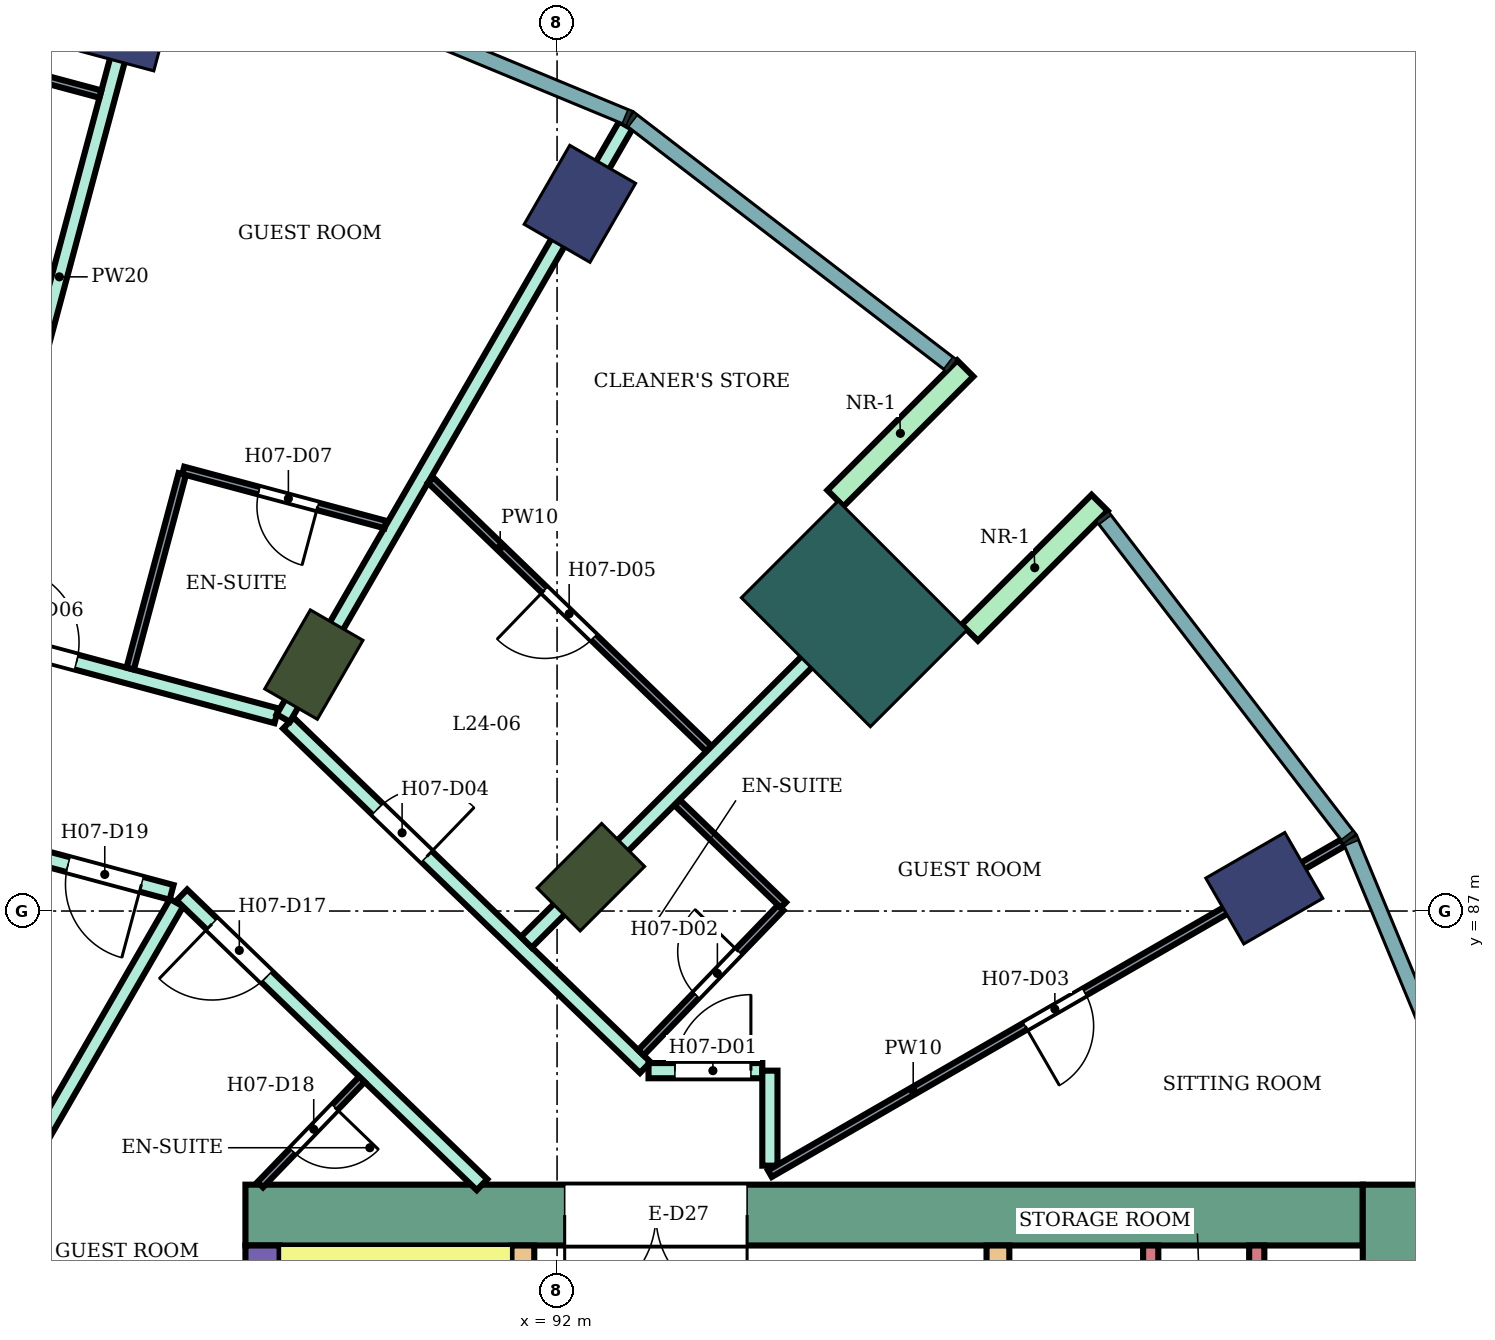
"""IFC4 building model, lengths in metres.
Left out: names, types, materials, properties, quantities, classifications, styles, units other than length and angle.
Written with IfcOpenShell. Run it as: python <this file> out.ifc"""

import sys

from ifc_helpers import new_model, si_unit, direction, frame, frame_2d, origin, origin_2d, place, context, subcontext, project, spatial, rectangle, extrude, element, fill, save


model = new_model("IFC4")
c1 = context("Model", 3, precision=1e-05, world=origin(), true_north=direction((0.0, 1.0)))
c2 = subcontext(c1, "Body", "Model", "MODEL_VIEW")
j1 = project(units=[si_unit("LENGTHUNIT", "METRE"), si_unit("PLANEANGLEUNIT", "RADIAN")], contexts=[c1])
p1 = place(None, origin())
s1 = spatial("IfcSite", under=j1, at=p1, CompositionType="ELEMENT")
p2 = place(p1, origin())
s2 = spatial("IfcBuilding", under=s1, at=p2, CompositionType="ELEMENT")
p3 = place(p2, frame((0.0, 0.0, 105.2)))
s3 = spatial("IfcBuildingStorey", under=s2, at=p3, CompositionType="ELEMENT", Elevation=105.2)
for number, where, z_axis, x_axis in (
    (1, (101.304, 87.3, 0.0), (0.0, 0.0, 1.0), (0.866, 0.5, 0.0)),
    (2, (92.3, 96.304, 0.0), (0.0, 0.0, 1.0), (0.5, 0.866, 0.0)),
    (3, (86.367, 98.762, 0.0), (0.0, 0.0, 1.0), (0.259, 0.966, 0.0)),
):
    element("IfcColumn", number, at=place(p3, frame(where, z_axis=z_axis, x_axis=x_axis)), inside=s3, PredefinedType="COLUMN", context=c2, shape_type="SweptSolid", body=[
        extrude(rectangle(XDim=1.2, YDim=1.0, at=origin_2d()), origin(), (0.0, 0.0, 1.0), 3.8),
    ])
for number, where, z_axis, x_axis in (
    (4, (92.445, 87.445, 0.0), (0.0, 0.0, 1.0), (0.707, 0.707, 0.0)),
    (5, (88.8, 90.242, 0.0), (0.0, 0.0, 1.0), (0.5, 0.866, 0.0)),
):
    element("IfcColumn", number, at=place(p3, frame(where, z_axis=z_axis, x_axis=x_axis)), inside=s3, PredefinedType="COLUMN", context=c2, shape_type="SweptSolid", body=[
        extrude(rectangle(XDim=1.2, YDim=0.8, at=origin_2d()), origin(), (0.0, 0.0, 1.0), 3.8),
    ])
p4 = place(p3, frame((95.91, 90.91, 0.0), z_axis=(0.0, 0.0, 1.0), x_axis=(0.707106781187, 0.707106781187, 0.0)))
e6 = element("IfcColumn", 6, at=p4, inside=s3, PredefinedType="COLUMN", context=c2, shape_type="SweptSolid", body=[
    extrude(rectangle(XDim=1.8, YDim=2.4, at=origin_2d()), origin(), (0.0, 0.0, 1.0), 3.8),
])
p5 = place(p3, frame((87.9, 83.0, 0.0), z_axis=(0.0, 0.0, 1.0), x_axis=(1.0, 0.0, 0.0)))
e7 = element("IfcWall", 7, at=p5, inside=s3, PredefinedType="SHEAR", context=c2, shape_type="SweptSolid", body=[
    extrude(rectangle(XDim=14.7, YDim=0.8, at=frame_2d((7.35, 0.0))), origin(), (0.0, 0.0, 1.0), 3.45),
])
p6 = place(p5, frame((4.2, 0.0, 0.0)))
e8 = element("IfcOpeningElement", 8, at=p6, cuts=e7, PredefinedType="OPENING", context=c2, shape_type="SweptSolid", body=[
    extrude(rectangle(XDim=2.4, YDim=2.4, at=frame_2d((1.2, 1.2))), frame((0.0, 0.41, 0.0), z_axis=(0.0, -1.0, 0.0), x_axis=(1.0, 0.0, 0.0)), (0.0, 0.0, 1.0), 0.82),
])
p7 = place(p3, frame((88.125, 75.0, 0.0), z_axis=(0.0, 0.0, 1.0), x_axis=(0.0, 1.0, 0.0)))
e9 = element("IfcWall", 9, at=p7, inside=s3, PredefinedType="SHEAR", context=c2, shape_type="SweptSolid", body=[
    extrude(rectangle(XDim=7.6, YDim=0.45, at=frame_2d((3.8, 0.0))), origin(), (0.0, 0.0, 1.0), 3.45),
])
p8 = place(p3, frame((103.0, 66.6, 0.0), z_axis=(0.0, 0.0, 1.0), x_axis=(0.0, 1.0, 0.0)))
e10 = element("IfcWall", 10, at=p8, inside=s3, PredefinedType="SHEAR", context=c2, shape_type="SweptSolid", body=[
    extrude(rectangle(XDim=16.8, YDim=0.8, at=frame_2d((8.4, 0.0))), origin(), (0.0, 0.0, 1.0), 3.45),
])
p9 = place(p3, frame((91.55, 75.0, 0.0), z_axis=(0.0, 0.0, 1.0), x_axis=(0.0, 1.0, 0.0)))
e11 = element("IfcWall", 11, at=p9, inside=s3, PredefinedType="SHEAR", context=c2, shape_type="SweptSolid", body=[
    extrude(rectangle(XDim=7.6, YDim=0.3, at=frame_2d((3.8, 0.0))), origin(), (0.0, 0.0, 1.0), 3.45),
])
p10 = place(p9, frame((1.85, 0.0, 0.0)))
e12 = element("IfcOpeningElement", 12, at=p10, cuts=e11, PredefinedType="OPENING", context=c2, shape_type="SweptSolid", body=[
    extrude(rectangle(XDim=0.9, YDim=2.1, at=frame_2d((0.45, 1.05))), frame((0.0, 0.16, 0.0), z_axis=(0.0, -1.0, 0.0), x_axis=(1.0, 0.0, 0.0)), (0.0, 0.0, 1.0), 0.32),
])
p11 = place(p3, frame((97.8, 78.6, 0.0), z_axis=(0.0, 0.0, 1.0), x_axis=(0.0, 1.0, 0.0)))
e13 = element("IfcWall", 13, at=p11, inside=s3, PredefinedType="SHEAR", context=c2, shape_type="SweptSolid", body=[
    extrude(rectangle(XDim=4.0, YDim=0.3, at=frame_2d((2.0, 0.0))), origin(), (0.0, 0.0, 1.0), 3.45),
])
for number, where, z_axis, x_axis in (
    (14, (97.43, 90.662, 0.0), (0.0, 0.0, 1.0), (0.707, 0.707, 0.0)),
    (15, (95.662, 92.43, 0.0), (0.0, 0.0, 1.0), (0.707, 0.707, 0.0)),
):
    element("IfcWall", number, at=place(p3, frame(where, z_axis=z_axis, x_axis=x_axis)), inside=s3, PredefinedType="NOTDEFINED", context=c2, shape_type="SweptSolid", body=[
        extrude(rectangle(XDim=2.416, YDim=0.3, at=frame_2d((1.208, 0.0))), origin(), (0.0, 0.0, 1.0), 3.8),
    ])
p12 = place(p3, frame((80.0, 89.104, 0.0), z_axis=(0.0, 0.0, 1.0), x_axis=(0.965856548257, -0.259077455964, 0.0)))
e16 = element("IfcWall", 16, at=p12, inside=s3, PredefinedType="PARTITIONING", context=c2, shape_type="SweptSolid", body=[
    extrude(rectangle(XDim=7.173, YDim=0.2, at=frame_2d((3.586, 0.0))), origin(), (0.0, 0.0, 1.0), 3.35),
])
p13 = place(p12, frame((5.763, 0.0, 0.0)))
e17 = element("IfcOpeningElement", 17, at=p13, cuts=e16, PredefinedType="OPENING", context=c2, shape_type="SweptSolid", body=[
    extrude(rectangle(XDim=1.0, YDim=2.1, at=frame_2d((0.5, 1.05))), frame((0.0, 0.11, 0.0), z_axis=(0.0, -1.0, 0.0), x_axis=(1.0, 0.0, 0.0)), (0.0, 0.0, 1.0), 0.22),
])
p14 = place(p3, frame((80.0, 91.797, 0.0), z_axis=(0.0, 0.0, 1.0), x_axis=(0.965857042792, -0.259075612301, 0.0)))
e18 = element("IfcWall", 18, at=p14, inside=s3, PredefinedType="PARTITIONING", context=c2, shape_type="SweptSolid", body=[
    extrude(rectangle(XDim=8.602, YDim=0.2, at=frame_2d((4.301, 0.0))), origin(), (0.0, 0.0, 1.0), 3.35),
])
p15 = place(p14, frame((4.877, 0.0, 0.0)))
e19 = element("IfcOpeningElement", 19, at=p15, cuts=e18, PredefinedType="OPENING", context=c2, shape_type="SweptSolid", body=[
    extrude(rectangle(XDim=1.0, YDim=2.1, at=frame_2d((0.5, 1.05))), frame((0.0, 0.11, 0.0), z_axis=(0.0, -1.0, 0.0), x_axis=(1.0, 0.0, 0.0)), (0.0, 0.0, 1.0), 0.22),
])
p16 = place(p14, frame((1.683, 0.0, 0.0)))
e20 = element("IfcOpeningElement", 20, at=p16, cuts=e18, PredefinedType="OPENING", context=c2, shape_type="SweptSolid", body=[
    extrude(rectangle(XDim=1.0, YDim=2.1, at=frame_2d((0.5, 1.05))), frame((0.0, 0.11, 0.0), z_axis=(0.0, -1.0, 0.0), x_axis=(1.0, 0.0, 0.0)), (0.0, 0.0, 1.0), 0.22),
])
p17 = place(p3, frame((83.85, 81.667, 0.0), z_axis=(0.0, 0.0, 1.0), x_axis=(0.500224530691, 0.865895732115, 0.0)))
e21 = element("IfcWall", 21, at=p17, inside=s3, PredefinedType="PARTITIONING", context=c2, shape_type="SweptSolid", body=[
    extrude(rectangle(XDim=6.285, YDim=0.2, at=frame_2d((3.143, 0.0))), origin(), (0.0, 0.0, 1.0), 3.35),
])
p18 = place(p3, frame((84.225, 90.768, 0.0), z_axis=(0.0, 0.0, 1.0), x_axis=(0.258895798654, 0.965905256968, 0.0)))
e22 = element("IfcWall", 22, at=p18, inside=s3, PredefinedType="PARTITIONING", context=c2, shape_type="SweptSolid", body=[
    extrude(rectangle(XDim=9.474, YDim=0.2, at=frame_2d((4.737, 0.0))), origin(), (0.0, 0.0, 1.0), 3.35),
])
p19 = place(p3, frame((87.064, 87.211, 0.0), z_axis=(0.0, 0.0, 1.0), x_axis=(0.719540958932, -0.694450004262, 0.0)))
e23 = element("IfcWall", 23, at=p19, inside=s3, PredefinedType="PARTITIONING", context=c2, shape_type="SweptSolid", body=[
    extrude(rectangle(XDim=5.488, YDim=0.2, at=frame_2d((2.744, 0.0))), origin(), (0.0, 0.0, 1.0), 3.35),
])
p20 = place(p19, frame((0.55, 0.0, 0.0)))
e24 = element("IfcOpeningElement", 24, at=p20, cuts=e23, PredefinedType="OPENING", context=c2, shape_type="SweptSolid", body=[
    extrude(rectangle(XDim=1.0, YDim=2.1, at=frame_2d((0.5, 1.05))), frame((0.0, 0.11, 0.0), z_axis=(0.0, -1.0, 0.0), x_axis=(1.0, 0.0, 0.0)), (0.0, 0.0, 1.0), 0.22),
])
p21 = place(p3, frame((88.465, 89.473, 0.0), z_axis=(0.0, 0.0, 1.0), x_axis=(0.719531044682, -0.694460276574, 0.0)))
e25 = element("IfcWall", 25, at=p21, inside=s3, PredefinedType="PARTITIONING", context=c2, shape_type="SweptSolid", body=[
    extrude(rectangle(XDim=6.524, YDim=0.2, at=frame_2d((3.262, 0.0))), origin(), (0.0, 0.0, 1.0), 3.35),
])
p22 = place(p21, frame((1.629, 0.0, 0.0)))
e26 = element("IfcOpeningElement", 26, at=p22, cuts=e25, PredefinedType="OPENING", context=c2, shape_type="SweptSolid", body=[
    extrude(rectangle(XDim=0.9, YDim=2.1, at=frame_2d((0.45, 1.05))), frame((0.0, 0.11, 0.0), z_axis=(0.0, -1.0, 0.0), x_axis=(1.0, 0.0, 0.0)), (0.0, 0.0, 1.0), 0.22),
])
p23 = place(p3, frame((88.398, 89.539, 0.0), z_axis=(0.0, 0.0, 1.0), x_axis=(0.50025185873, 0.86587994424, 0.0)))
e27 = element("IfcWall", 27, at=p23, inside=s3, PredefinedType="PARTITIONING", context=c2, shape_type="SweptSolid", body=[
    extrude(rectangle(XDim=9.008, YDim=0.2, at=frame_2d((4.504, 0.0))), origin(), (0.0, 0.0, 1.0), 3.35),
])
p24 = place(p3, frame((91.595, 86.59, 0.0), z_axis=(0.0, 0.0, 1.0), x_axis=(0.707268206752, 0.706945318761, 0.0)))
e28 = element("IfcWall", 28, at=p24, inside=s3, PredefinedType="PARTITIONING", context=c2, shape_type="SweptSolid", body=[
    extrude(rectangle(XDim=6.805, YDim=0.2, at=frame_2d((3.402, 0.0))), origin(), (0.0, 0.0, 1.0), 3.35),
])
p25 = place(p3, frame((93.203, 84.9, 0.0), z_axis=(0.0, 0.0, 1.0), x_axis=(1.0, 0.0, 0.0)))
e29 = element("IfcWall", 29, at=p25, inside=s3, PredefinedType="PARTITIONING", context=c2, shape_type="SweptSolid", body=[
    extrude(rectangle(XDim=1.497, YDim=0.2, at=frame_2d((0.749, 0.0))), origin(), (0.0, 0.0, 1.0), 3.35),
])
p26 = place(p25, frame((0.347, 0.0, 0.0)))
e30 = element("IfcOpeningElement", 30, at=p26, cuts=e29, PredefinedType="OPENING", context=c2, shape_type="SweptSolid", body=[
    extrude(rectangle(XDim=1.0, YDim=2.1, at=frame_2d((0.5, 1.05))), frame((0.0, 0.11, 0.0), z_axis=(0.0, -1.0, 0.0), x_axis=(1.0, 0.0, 0.0)), (0.0, 0.0, 1.0), 0.22),
])
p27 = place(p3, frame((94.8, 83.65, 0.0), z_axis=(0.0, 0.0, 1.0), x_axis=(0.0, 1.0, 0.0)))
e31 = element("IfcWall", 31, at=p27, inside=s3, PredefinedType="PARTITIONING", context=c2, shape_type="SweptSolid", body=[
    extrude(rectangle(XDim=1.25, YDim=0.2, at=frame_2d((0.625, 0.0))), origin(), (0.0, 0.0, 1.0), 3.35),
])
p28 = place(p3, frame((84.157, 98.24, 0.0), z_axis=(0.0, 0.0, 1.0), x_axis=(0.96584126793, -0.259134415244, 0.0)))
e32 = element("IfcWall", 32, at=p28, inside=s3, PredefinedType="PARTITIONING", context=c2, shape_type="SweptSolid", body=[
    extrude(rectangle(XDim=1.899, YDim=0.1, at=frame_2d((0.95, 0.0))), origin(), (0.0, 0.0, 1.0), 3.35),
])
p29 = place(p3, frame((86.384, 90.19, 0.0), z_axis=(0.0, 0.0, 1.0), x_axis=(0.258677737588, 0.965963678446, 0.0)))
e33 = element("IfcWall", 33, at=p29, inside=s3, PredefinedType="PARTITIONING", context=c2, shape_type="SweptSolid", body=[
    extrude(rectangle(XDim=2.649, YDim=0.1, at=frame_2d((1.325, 0.0))), origin(), (0.0, 0.0, 1.0), 3.35),
])
p30 = place(p3, frame((87.082, 92.797, 0.0), z_axis=(0.0, 0.0, 1.0), x_axis=(0.965942906494, -0.258755292495, 0.0)))
e34 = element("IfcWall", 34, at=p30, inside=s3, PredefinedType="PARTITIONING", context=c2, shape_type="SweptSolid", body=[
    extrude(rectangle(XDim=2.753, YDim=0.1, at=frame_2d((1.376, 0.0))), origin(), (0.0, 0.0, 1.0), 3.35),
])
p31 = place(p30, frame((1.032, 0.0, 0.0)))
e35 = element("IfcOpeningElement", 35, at=p31, cuts=e34, PredefinedType="OPENING", context=c2, shape_type="SweptSolid", body=[
    extrude(rectangle(XDim=0.8, YDim=2.1, at=frame_2d((0.4, 1.05))), frame((0.0, 0.06, 0.0), z_axis=(0.0, -1.0, 0.0), x_axis=(1.0, 0.0, 0.0)), (0.0, 0.0, 1.0), 0.12),
])
p32 = place(p3, frame((88.095, 83.4, 0.0), z_axis=(0.0, 0.0, 1.0), x_axis=(0.694447472534, 0.719543402368, 0.0)))
e36 = element("IfcWall", 36, at=p32, inside=s3, PredefinedType="PARTITIONING", context=c2, shape_type="SweptSolid", body=[
    extrude(rectangle(XDim=1.926, YDim=0.1, at=frame_2d((0.963, 0.0))), origin(), (0.0, 0.0, 1.0), 3.35),
])
p33 = place(p32, frame((0.613, 0.0, 0.0)))
e37 = element("IfcOpeningElement", 37, at=p33, cuts=e36, PredefinedType="OPENING", context=c2, shape_type="SweptSolid", body=[
    extrude(rectangle(XDim=0.8, YDim=2.1, at=frame_2d((0.4, 1.05))), frame((0.0, 0.06, 0.0), z_axis=(0.0, -1.0, 0.0), x_axis=(1.0, 0.0, 0.0)), (0.0, 0.0, 1.0), 0.12),
])
p34 = place(p3, frame((90.337, 92.669, 0.0), z_axis=(0.0, 0.0, 1.0), x_axis=(0.71952469278, -0.694466857726, 0.0)))
e38 = element("IfcWall", 38, at=p34, inside=s3, PredefinedType="PARTITIONING", context=c2, shape_type="SweptSolid", body=[
    extrude(rectangle(XDim=5.086, YDim=0.1, at=frame_2d((2.543, 0.0))), origin(), (0.0, 0.0, 1.0), 3.35),
])
p35 = place(p34, frame((2.083, 0.0, 0.0)))
e39 = element("IfcOpeningElement", 39, at=p35, cuts=e38, PredefinedType="OPENING", context=c2, shape_type="SweptSolid", body=[
    extrude(rectangle(XDim=0.9, YDim=2.1, at=frame_2d((0.45, 1.05))), frame((0.0, 0.06, 0.0), z_axis=(0.0, -1.0, 0.0), x_axis=(1.0, 0.0, 0.0)), (0.0, 0.0, 1.0), 0.12),
])
p36 = place(p3, frame((93.103, 85.136, 0.0), z_axis=(0.0, 0.0, 1.0), x_axis=(0.694324808789, 0.719661767708, 0.0)))
e40 = element("IfcWall", 40, at=p36, inside=s3, PredefinedType="PARTITIONING", context=c2, shape_type="SweptSolid", body=[
    extrude(rectangle(XDim=2.65, YDim=0.1, at=frame_2d((1.325, 0.0))), origin(), (0.0, 0.0, 1.0), 3.35),
])
p37 = place(p36, frame((1.05, 0.0, 0.0)))
e41 = element("IfcOpeningElement", 41, at=p37, cuts=e40, PredefinedType="OPENING", context=c2, shape_type="SweptSolid", body=[
    extrude(rectangle(XDim=0.8, YDim=2.1, at=frame_2d((0.4, 1.05))), frame((0.0, 0.06, 0.0), z_axis=(0.0, -1.0, 0.0), x_axis=(1.0, 0.0, 0.0)), (0.0, 0.0, 1.0), 0.12),
])
p38 = place(p3, frame((93.581, 88.426, 0.0), z_axis=(0.0, 0.0, 1.0), x_axis=(0.719707242969, -0.694277670977, 0.0)))
e42 = element("IfcWall", 42, at=p38, inside=s3, PredefinedType="PARTITIONING", context=c2, shape_type="SweptSolid", body=[
    extrude(rectangle(XDim=1.939, YDim=0.1, at=frame_2d((0.97, 0.0))), origin(), (0.0, 0.0, 1.0), 3.35),
])
p39 = place(p3, frame((94.8, 83.545, 0.0), z_axis=(0.0, 0.0, 1.0), x_axis=(0.86602264145, 0.500004784474, 0.0)))
e43 = element("IfcWall", 43, at=p39, inside=s3, PredefinedType="PARTITIONING", context=c2, shape_type="SweptSolid", body=[
    extrude(rectangle(XDim=8.708, YDim=0.1, at=frame_2d((4.354, 0.0))), origin(), (0.0, 0.0, 1.0), 3.35),
])
p40 = place(p39, frame((3.879, 0.0, 0.0)))
e44 = element("IfcOpeningElement", 44, at=p40, cuts=e43, PredefinedType="OPENING", context=c2, shape_type="SweptSolid", body=[
    extrude(rectangle(XDim=0.9, YDim=2.1, at=frame_2d((0.45, 1.05))), frame((0.0, 0.06, 0.0), z_axis=(0.0, -1.0, 0.0), x_axis=(1.0, 0.0, 0.0)), (0.0, 0.0, 1.0), 0.12),
])
for number, where, z_axis, x_axis in (
    (45, (99.81, 78.9, 0.0), (0.0, 0.0, 1.0), (0.0, 1.0, 0.0)),
    (46, (101.205, 78.9, 0.0), (0.0, 0.0, 1.0), (0.0, 1.0, 0.0)),
):
    element("IfcWall", number, at=place(p3, frame(where, z_axis=z_axis, x_axis=x_axis)), inside=s3, PredefinedType="PARTITIONING", context=c2, shape_type="SweptSolid", body=[
        extrude(rectangle(XDim=3.7, YDim=0.2, at=frame_2d((1.85, 0.0))), origin(), (0.0, 0.0, 1.0), 3.45),
    ])
p41 = place(p26, origin())
e47 = element("IfcDoor", 47, at=p41, inside=s3, OperationType="SINGLE_SWING_RIGHT", PredefinedType="DOOR", context=c2, shape_type="SweptSolid", body=[
    extrude(rectangle(XDim=1.0, YDim=2.1, at=frame_2d((0.5, 1.05))), frame((0.0, 0.025, 0.0), z_axis=(0.0, -1.0, 0.0), x_axis=(1.0, 0.0, 0.0)), (0.0, 0.0, 1.0), 0.05),
])
fill(e30, e47)
p42 = place(p37, origin())
e48 = element("IfcDoor", 48, at=p42, inside=s3, OperationType="SINGLE_SWING_RIGHT", PredefinedType="DOOR", context=c2, shape_type="SweptSolid", body=[
    extrude(rectangle(XDim=0.8, YDim=2.1, at=frame_2d((0.4, 1.05))), frame((0.0, 0.025, 0.0), z_axis=(0.0, -1.0, 0.0), x_axis=(1.0, 0.0, 0.0)), (0.0, 0.0, 1.0), 0.05),
])
fill(e41, e48)
p43 = place(p40, frame((0.9, 0.0, 0.0), z_axis=(0.0, 0.0, 1.0), x_axis=(-1.0, 0.0, 0.0)))
e49 = element("IfcDoor", 49, at=p43, inside=s3, OperationType="SINGLE_SWING_RIGHT", PredefinedType="DOOR", context=c2, shape_type="SweptSolid", body=[
    extrude(rectangle(XDim=0.9, YDim=2.1, at=frame_2d((0.45, 1.05))), frame((0.0, 0.025, 0.0), z_axis=(0.0, -1.0, 0.0), x_axis=(1.0, 0.0, 0.0)), (0.0, 0.0, 1.0), 0.05),
])
fill(e44, e49)
p44 = place(p22, origin())
e50 = element("IfcDoor", 50, at=p44, inside=s3, OperationType="SINGLE_SWING_RIGHT", PredefinedType="DOOR", context=c2, shape_type="SweptSolid", body=[
    extrude(rectangle(XDim=0.9, YDim=2.1, at=frame_2d((0.45, 1.05))), frame((0.0, 0.025, 0.0), z_axis=(0.0, -1.0, 0.0), x_axis=(1.0, 0.0, 0.0)), (0.0, 0.0, 1.0), 0.05),
])
fill(e26, e50)
p45 = place(p35, frame((0.9, 0.0, 0.0), z_axis=(0.0, 0.0, 1.0), x_axis=(-1.0, 0.0, 0.0)))
e51 = element("IfcDoor", 51, at=p45, inside=s3, OperationType="SINGLE_SWING_RIGHT", PredefinedType="DOOR", context=c2, shape_type="SweptSolid", body=[
    extrude(rectangle(XDim=0.9, YDim=2.1, at=frame_2d((0.45, 1.05))), frame((0.0, 0.025, 0.0), z_axis=(0.0, -1.0, 0.0), x_axis=(1.0, 0.0, 0.0)), (0.0, 0.0, 1.0), 0.05),
])
fill(e39, e51)
p46 = place(p15, origin())
e52 = element("IfcDoor", 52, at=p46, inside=s3, OperationType="SINGLE_SWING_LEFT", PredefinedType="DOOR", context=c2, shape_type="SweptSolid", body=[
    extrude(rectangle(XDim=1.0, YDim=2.1, at=frame_2d((0.5, 1.05))), frame((0.0, 0.025, 0.0), z_axis=(0.0, -1.0, 0.0), x_axis=(1.0, 0.0, 0.0)), (0.0, 0.0, 1.0), 0.05),
])
fill(e19, e52)
p47 = place(p31, frame((0.8, 0.0, 0.0), z_axis=(0.0, 0.0, 1.0), x_axis=(-1.0, 0.0, 0.0)))
e53 = element("IfcDoor", 53, at=p47, inside=s3, OperationType="SINGLE_SWING_LEFT", PredefinedType="DOOR", context=c2, shape_type="SweptSolid", body=[
    extrude(rectangle(XDim=0.8, YDim=2.1, at=frame_2d((0.4, 1.05))), frame((0.0, 0.025, 0.0), z_axis=(0.0, -1.0, 0.0), x_axis=(1.0, 0.0, 0.0)), (0.0, 0.0, 1.0), 0.05),
])
fill(e35, e53)
p48 = place(p20, frame((1.0, 0.0, 0.0), z_axis=(0.0, 0.0, 1.0), x_axis=(-1.0, 0.0, 0.0)))
e54 = element("IfcDoor", 54, at=p48, inside=s3, OperationType="SINGLE_SWING_RIGHT", PredefinedType="DOOR", context=c2, shape_type="SweptSolid", body=[
    extrude(rectangle(XDim=1.0, YDim=2.1, at=frame_2d((0.5, 1.05))), frame((0.0, 0.025, 0.0), z_axis=(0.0, -1.0, 0.0), x_axis=(1.0, 0.0, 0.0)), (0.0, 0.0, 1.0), 0.05),
])
fill(e24, e54)
p49 = place(p33, frame((0.8, 0.0, 0.0), z_axis=(0.0, 0.0, 1.0), x_axis=(-1.0, 0.0, 0.0)))
e55 = element("IfcDoor", 55, at=p49, inside=s3, OperationType="SINGLE_SWING_LEFT", PredefinedType="DOOR", context=c2, shape_type="SweptSolid", body=[
    extrude(rectangle(XDim=0.8, YDim=2.1, at=frame_2d((0.4, 1.05))), frame((0.0, 0.025, 0.0), z_axis=(0.0, -1.0, 0.0), x_axis=(1.0, 0.0, 0.0)), (0.0, 0.0, 1.0), 0.05),
])
fill(e37, e55)
p50 = place(p13, frame((1.0, 0.0, 0.0), z_axis=(0.0, 0.0, 1.0), x_axis=(-1.0, 0.0, 0.0)))
e56 = element("IfcDoor", 56, at=p50, inside=s3, OperationType="SINGLE_SWING_LEFT", PredefinedType="DOOR", context=c2, shape_type="SweptSolid", body=[
    extrude(rectangle(XDim=1.0, YDim=2.1, at=frame_2d((0.5, 1.05))), frame((0.0, 0.025, 0.0), z_axis=(0.0, -1.0, 0.0), x_axis=(1.0, 0.0, 0.0)), (0.0, 0.0, 1.0), 0.05),
])
fill(e17, e56)
p51 = place(p6, frame((2.4, 0.0, 0.0), z_axis=(0.0, 0.0, 1.0), x_axis=(-1.0, 0.0, 0.0)))
e57 = element("IfcDoor", 57, at=p51, inside=s3, OperationType="DOUBLE_DOOR_SINGLE_SWING", PredefinedType="DOOR", context=c2, shape_type="SweptSolid", body=[
    extrude(rectangle(XDim=2.4, YDim=2.4, at=frame_2d((1.2, 1.2))), frame((0.0, 0.025, 0.0), z_axis=(0.0, -1.0, 0.0), x_axis=(1.0, 0.0, 0.0)), (0.0, 0.0, 1.0), 0.05),
])
fill(e8, e57)
save(model, sys.argv[1])
